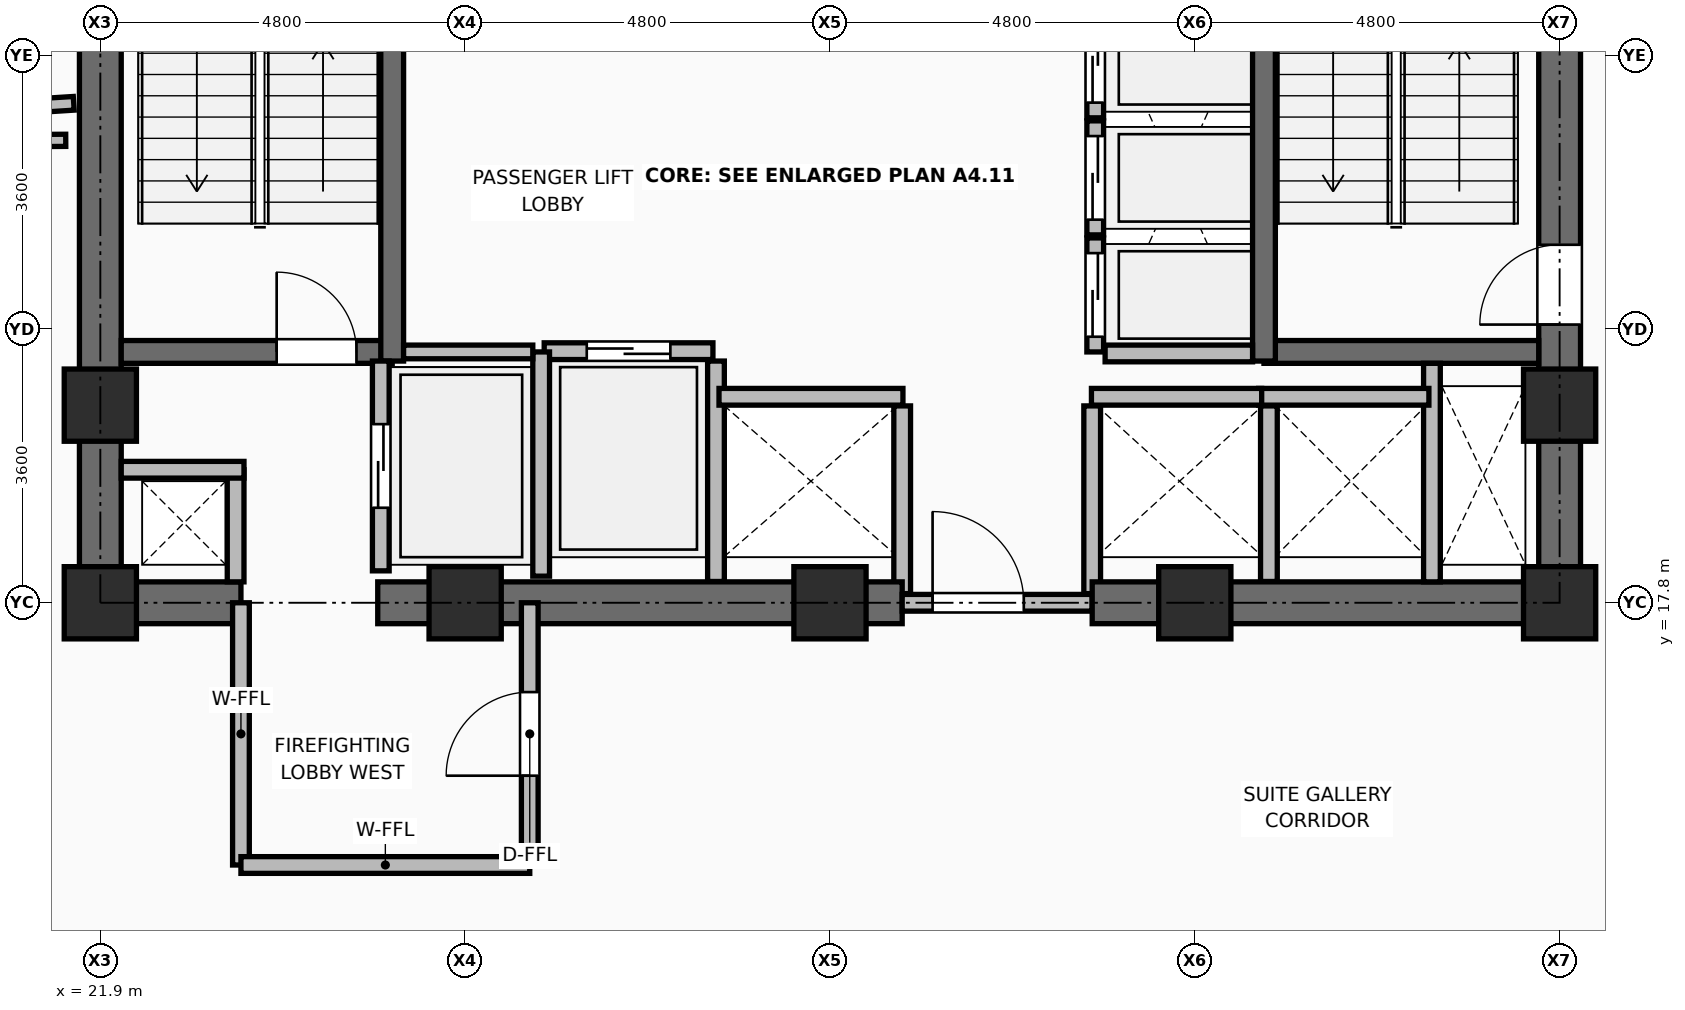
"""IFC4 building model, lengths in metres.
Left out: names, types, materials, properties, quantities, classifications, styles, units other than length and angle.
Written with IfcOpenShell. Run it as: python <this file> out.ifc"""

import sys

from ifc_helpers import new_model, si_unit, direction, frame, frame_2d, origin, origin_2d, place, context, subcontext, project, spatial, rectangle, extrude, element, fill, save


model = new_model("IFC4")
c1 = context("Model", 3, precision=1e-05, world=origin(), true_north=direction((0.0, 1.0)))
c2 = subcontext(c1, "Body", "Model", "MODEL_VIEW")
j1 = project(units=[si_unit("LENGTHUNIT", "METRE"), si_unit("PLANEANGLEUNIT", "RADIAN")], contexts=[c1])
p1 = place(None, origin())
s1 = spatial("IfcSite", under=j1, at=p1, CompositionType="ELEMENT")
p2 = place(p1, origin())
s2 = spatial("IfcBuilding", under=s1, at=p2, CompositionType="ELEMENT")
p3 = place(p2, frame((0.0, 0.0, 153.45)))
s3 = spatial("IfcBuildingStorey", under=s2, at=p3, CompositionType="ELEMENT", Elevation=153.45)
for number, where, z_axis, x_axis in (
    (1, (21.9, 17.8, 0.0), (0.0, 0.0, 1.0), (1.0, 0.0, 0.0)),
    (2, (26.7, 17.8, 0.0), (0.0, 0.0, 1.0), (1.0, 0.0, 0.0)),
    (3, (31.5, 17.8, 0.0), (0.0, 0.0, 1.0), (1.0, 0.0, 0.0)),
    (4, (36.3, 17.8, 0.0), (0.0, 0.0, 1.0), (1.0, 0.0, 0.0)),
    (5, (41.1, 17.8, 0.0), (0.0, 0.0, 1.0), (1.0, 0.0, 0.0)),
    (6, (21.9, 20.4, 0.0), (0.0, 0.0, 1.0), (1.0, 0.0, 0.0)),
    (7, (41.1, 20.4, 0.0), (0.0, 0.0, 1.0), (1.0, 0.0, 0.0)),
):
    element("IfcColumn", number, at=place(p3, frame(where, z_axis=z_axis, x_axis=x_axis)), inside=s3, PredefinedType="COLUMN", context=c2, shape_type="SweptSolid", body=[
        extrude(rectangle(XDim=0.95, YDim=0.95, at=origin_2d()), origin(), (0.0, 0.0, 1.0), 3.75),
    ])
p4 = place(p3, frame((30.0, 18.08, 0.0), z_axis=(0.0, 0.0, 1.0), x_axis=(0.0, 1.0, 0.0)))
e8 = element("IfcWall", 8, at=p4, inside=s3, PredefinedType="PARTITIONING", context=c2, shape_type="SweptSolid", body=[
    extrude(rectangle(XDim=2.9, YDim=0.22, at=frame_2d((1.45, 0.0))), origin(), (0.0, 0.0, 1.0), 3.545),
])
for number, where, z_axis, x_axis in (
    (9, (32.45, 17.92, 0.0), (0.0, 0.0, 1.0), (0.0, 1.0, 0.0)),
    (10, (34.95, 17.92, 0.0), (0.0, 0.0, 1.0), (0.0, 1.0, 0.0)),
):
    element("IfcWall", number, at=place(p3, frame(where, z_axis=z_axis, x_axis=x_axis)), inside=s3, PredefinedType="PARTITIONING", context=c2, shape_type="SweptSolid", body=[
        extrude(rectangle(XDim=2.47, YDim=0.22, at=frame_2d((1.235, 0.0))), origin(), (0.0, 0.0, 1.0), 3.006),
    ])
p5 = place(p3, frame((37.275, 18.08, 0.0), z_axis=(0.0, 0.0, 1.0), x_axis=(0.0, 1.0, 0.0)))
e11 = element("IfcWall", 11, at=p5, inside=s3, PredefinedType="PARTITIONING", context=c2, shape_type="SweptSolid", body=[
    extrude(rectangle(XDim=2.31, YDim=0.22, at=frame_2d((1.155, 0.0))), origin(), (0.0, 0.0, 1.0), 3.545),
])
p6 = place(p3, frame((21.625, 17.8, 0.0), z_axis=(0.0, 0.0, 1.0), x_axis=(1.0, 0.0, 0.0)))
e12 = element("IfcWall", 12, at=p6, inside=s3, PredefinedType="SHEAR", context=c2, shape_type="SweptSolid", body=[
    extrude(rectangle(XDim=2.125, YDim=0.55, at=frame_2d((1.062, 0.0))), origin(), (0.0, 0.0, 1.0), 3.57),
])
p7 = place(p3, frame((25.55, 17.8, 0.0), z_axis=(0.0, 0.0, 1.0), x_axis=(1.0, 0.0, 0.0)))
e13 = element("IfcWall", 13, at=p7, inside=s3, PredefinedType="SHEAR", context=c2, shape_type="SweptSolid", body=[
    extrude(rectangle(XDim=6.9, YDim=0.55, at=frame_2d((3.45, 0.0))), origin(), (0.0, 0.0, 1.0), 3.57),
])
p8 = place(p3, frame((32.45, 17.8, 0.0), z_axis=(0.0, 0.0, 1.0), x_axis=(1.0, 0.0, 0.0)))
e14 = element("IfcWall", 14, at=p8, inside=s3, PredefinedType="PARTITIONING", context=c2, shape_type="SweptSolid", body=[
    extrude(rectangle(XDim=2.5, YDim=0.22, at=frame_2d((1.25, 0.0))), origin(), (0.0, 0.0, 1.0), 3.006),
])
p9 = place(p8, frame((0.4, 0.0, 0.0)))
e15 = element("IfcOpeningElement", 15, at=p9, cuts=e14, PredefinedType="OPENING", context=c2, shape_type="SweptSolid", body=[
    extrude(rectangle(XDim=1.2, YDim=2.1, at=frame_2d((0.6, 1.05))), frame((0.0, 0.12, 0.0), z_axis=(0.0, -1.0, 0.0), x_axis=(1.0, 0.0, 0.0)), (0.0, 0.0, 1.0), 0.24),
])
p10 = place(p3, frame((34.95, 17.8, 0.0), z_axis=(0.0, 0.0, 1.0), x_axis=(1.0, 0.0, 0.0)))
e16 = element("IfcWall", 16, at=p10, inside=s3, PredefinedType="SHEAR", context=c2, shape_type="SweptSolid", body=[
    extrude(rectangle(XDim=6.425, YDim=0.55, at=frame_2d((3.212, 0.0))), origin(), (0.0, 0.0, 1.0), 3.57),
])
p11 = place(p3, frame((21.9, 18.075, 0.0), z_axis=(0.0, 0.0, 1.0), x_axis=(0.0, 1.0, 0.0)))
e17 = element("IfcWall", 17, at=p11, inside=s3, PredefinedType="SHEAR", context=c2, shape_type="SweptSolid", body=[
    extrude(rectangle(XDim=14.1, YDim=0.55, at=frame_2d((7.05, 0.0))), origin(), (0.0, 0.0, 1.0), 3.57),
])
p12 = place(p3, frame((41.1, 18.075, 0.0), z_axis=(0.0, 0.0, 1.0), x_axis=(0.0, 1.0, 0.0)))
e18 = element("IfcWall", 18, at=p12, inside=s3, PredefinedType="SHEAR", context=c2, shape_type="SweptSolid", body=[
    extrude(rectangle(XDim=14.1, YDim=0.55, at=frame_2d((7.05, 0.0))), origin(), (0.0, 0.0, 1.0), 3.57),
])
p13 = place(p12, frame((3.385, 0.0, 0.0)))
e19 = element("IfcOpeningElement", 19, at=p13, cuts=e18, PredefinedType="OPENING", context=c2, shape_type="SweptSolid", body=[
    extrude(rectangle(XDim=1.05, YDim=2.1, at=frame_2d((0.525, 1.05))), frame((0.0, 0.285, 0.0), z_axis=(0.0, -1.0, 0.0), x_axis=(1.0, 0.0, 0.0)), (0.0, 0.0, 1.0), 0.57),
])
p14 = place(p3, frame((22.175, 21.1, 0.0), z_axis=(0.0, 0.0, 1.0), x_axis=(1.0, 0.0, 0.0)))
e20 = element("IfcWall", 20, at=p14, inside=s3, PredefinedType="SHEAR", context=c2, shape_type="SweptSolid", body=[
    extrude(rectangle(XDim=3.565, YDim=0.3, at=frame_2d((1.782, 0.0))), origin(), (0.0, 0.0, 1.0), 3.57),
])
p15 = place(p14, frame((2.045, 0.0, 0.0)))
e21 = element("IfcOpeningElement", 21, at=p15, cuts=e20, PredefinedType="OPENING", context=c2, shape_type="SweptSolid", body=[
    extrude(rectangle(XDim=1.05, YDim=2.1, at=frame_2d((0.525, 1.05))), frame((0.0, 0.16, 0.0), z_axis=(0.0, -1.0, 0.0), x_axis=(1.0, 0.0, 0.0)), (0.0, 0.0, 1.0), 0.32),
])
p16 = place(p3, frame((25.74, 20.98, 0.0), z_axis=(0.0, 0.0, 1.0), x_axis=(0.0, 1.0, 0.0)))
e22 = element("IfcWall", 22, at=p16, inside=s3, PredefinedType="SHEAR", context=c2, shape_type="SweptSolid", body=[
    extrude(rectangle(XDim=7.99, YDim=0.3, at=frame_2d((3.995, 0.0))), origin(), (0.0, 0.0, 1.0), 3.57),
])
p17 = place(p3, frame((37.21, 21.1, 0.0), z_axis=(0.0, 0.0, 1.0), x_axis=(1.0, 0.0, 0.0)))
e23 = element("IfcWall", 23, at=p17, inside=s3, PredefinedType="SHEAR", context=c2, shape_type="SweptSolid", body=[
    extrude(rectangle(XDim=3.615, YDim=0.3, at=frame_2d((1.808, 0.0))), origin(), (0.0, 0.0, 1.0), 3.57),
])
p18 = place(p3, frame((37.21, 20.98, 0.0), z_axis=(0.0, 0.0, 1.0), x_axis=(0.0, 1.0, 0.0)))
e24 = element("IfcWall", 24, at=p18, inside=s3, PredefinedType="SHEAR", context=c2, shape_type="SweptSolid", body=[
    extrude(rectangle(XDim=7.99, YDim=0.3, at=frame_2d((3.995, 0.0))), origin(), (0.0, 0.0, 1.0), 3.57),
])
p19 = place(p3, frame((23.68, 18.075, 0.0), z_axis=(0.0, 0.0, 1.0), x_axis=(0.0, 1.0, 0.0)))
e25 = element("IfcWall", 25, at=p19, inside=s3, PredefinedType="PARTITIONING", context=c2, shape_type="SweptSolid", body=[
    extrude(rectangle(XDim=1.475, YDim=0.22, at=frame_2d((0.738, 0.0))), origin(), (0.0, 0.0, 1.0), 3.55),
])
p20 = place(p3, frame((22.175, 19.55, 0.0), z_axis=(0.0, 0.0, 1.0), x_axis=(1.0, 0.0, 0.0)))
e26 = element("IfcWall", 26, at=p20, inside=s3, PredefinedType="PARTITIONING", context=c2, shape_type="SweptSolid", body=[
    extrude(rectangle(XDim=1.615, YDim=0.22, at=frame_2d((0.808, 0.0))), origin(), (0.0, 0.0, 1.0), 2.595),
])
p21 = place(p3, frame((39.42, 18.075, 0.0), z_axis=(0.0, 0.0, 1.0), x_axis=(0.0, 1.0, 0.0)))
e27 = element("IfcWall", 27, at=p21, inside=s3, PredefinedType="PARTITIONING", context=c2, shape_type="SweptSolid", body=[
    extrude(rectangle(XDim=2.875, YDim=0.22, at=frame_2d((1.438, 0.0))), origin(), (0.0, 0.0, 1.0), 3.55),
])
p22 = place(p3, frame((25.59, 18.22, 0.0), z_axis=(0.0, 0.0, 1.0), x_axis=(0.0, 1.0, 0.0)))
e28 = element("IfcWall", 28, at=p22, inside=s3, PredefinedType="PARTITIONING", context=c2, shape_type="SweptSolid", body=[
    extrude(rectangle(XDim=2.76, YDim=0.22, at=frame_2d((1.38, 0.0))), origin(), (0.0, 0.0, 1.0), 3.55),
])
p23 = place(p22, frame((0.83, 0.0, 0.0)))
e29 = element("IfcOpeningElement", 29, at=p23, cuts=e28, PredefinedType="OPENING", context=c2, shape_type="SweptSolid", body=[
    extrude(rectangle(XDim=1.1, YDim=2.2, at=frame_2d((0.55, 1.1))), frame((0.0, 0.12, 0.0), z_axis=(0.0, -1.0, 0.0), x_axis=(1.0, 0.0, 0.0)), (0.0, 0.0, 1.0), 0.24),
])
p24 = place(p3, frame((27.74, 21.11, 0.0), z_axis=(0.0, 0.0, 1.0), x_axis=(1.0, 0.0, 0.0)))
e30 = element("IfcWall", 30, at=p24, inside=s3, PredefinedType="PARTITIONING", context=c2, shape_type="SweptSolid", body=[
    extrude(rectangle(XDim=2.22, YDim=0.22, at=frame_2d((1.11, 0.0))), origin(), (0.0, 0.0, 1.0), 3.55),
])
p25 = place(p24, frame((0.56, 0.0, 0.0)))
e31 = element("IfcOpeningElement", 31, at=p25, cuts=e30, PredefinedType="OPENING", context=c2, shape_type="SweptSolid", body=[
    extrude(rectangle(XDim=1.1, YDim=2.2, at=frame_2d((0.55, 1.1))), frame((0.0, 0.12, 0.0), z_axis=(0.0, -1.0, 0.0), x_axis=(1.0, 0.0, 0.0)), (0.0, 0.0, 1.0), 0.24),
])
p26 = place(p3, frame((30.04, 20.51, 0.0), z_axis=(0.0, 0.0, 1.0), x_axis=(1.0, 0.0, 0.0)))
e32 = element("IfcWall", 32, at=p26, inside=s3, PredefinedType="PARTITIONING", context=c2, shape_type="SweptSolid", body=[
    extrude(rectangle(XDim=2.42, YDim=0.22, at=frame_2d((1.21, 0.0))), origin(), (0.0, 0.0, 1.0), 3.55),
])
for number, where, z_axis, x_axis in (
    (33, (37.14, 20.51, 0.0), (0.0, 0.0, 1.0), (1.0, 0.0, 0.0)),
    (34, (34.94, 20.51, 0.0), (0.0, 0.0, 1.0), (1.0, 0.0, 0.0)),
):
    element("IfcWall", number, at=place(p3, frame(where, z_axis=z_axis, x_axis=x_axis)), inside=s3, PredefinedType="PARTITIONING", context=c2, shape_type="SweptSolid", body=[
        extrude(rectangle(XDim=2.24, YDim=0.22, at=frame_2d((1.12, 0.0))), origin(), (0.0, 0.0, 1.0), 3.55),
    ])
p27 = place(p3, frame((34.99, 21.1, 0.0), z_axis=(0.0, 0.0, 1.0), x_axis=(0.0, 1.0, 0.0)))
e35 = element("IfcWall", 35, at=p27, inside=s3, PredefinedType="PARTITIONING", context=c2, shape_type="SweptSolid", body=[
    extrude(rectangle(XDim=1.5, YDim=0.22, at=frame_2d((0.75, 0.0))), origin(), (0.0, 0.0, 1.0), 3.55),
])
p28 = place(p27, frame((0.2, 0.0, 0.0)))
e36 = element("IfcOpeningElement", 36, at=p28, cuts=e35, PredefinedType="OPENING", context=c2, shape_type="SweptSolid", body=[
    extrude(rectangle(XDim=1.1, YDim=2.2, at=frame_2d((0.55, 1.1))), frame((0.0, 0.12, 0.0), z_axis=(0.0, -1.0, 0.0), x_axis=(1.0, 0.0, 0.0)), (0.0, 0.0, 1.0), 0.24),
])
p29 = place(p3, frame((34.99, 22.64, 0.0), z_axis=(0.0, 0.0, 1.0), x_axis=(0.0, 1.0, 0.0)))
e37 = element("IfcWall", 37, at=p29, inside=s3, PredefinedType="PARTITIONING", context=c2, shape_type="SweptSolid", body=[
    extrude(rectangle(XDim=1.5, YDim=0.22, at=frame_2d((0.75, 0.0))), origin(), (0.0, 0.0, 1.0), 3.55),
])
p30 = place(p29, frame((0.2, 0.0, 0.0)))
e38 = element("IfcOpeningElement", 38, at=p30, cuts=e37, PredefinedType="OPENING", context=c2, shape_type="SweptSolid", body=[
    extrude(rectangle(XDim=1.1, YDim=2.2, at=frame_2d((0.55, 1.1))), frame((0.0, 0.12, 0.0), z_axis=(0.0, -1.0, 0.0), x_axis=(1.0, 0.0, 0.0)), (0.0, 0.0, 1.0), 0.24),
])
p31 = place(p3, frame((34.99, 24.18, 0.0), z_axis=(0.0, 0.0, 1.0), x_axis=(0.0, 1.0, 0.0)))
e39 = element("IfcWall", 39, at=p31, inside=s3, PredefinedType="PARTITIONING", context=c2, shape_type="SweptSolid", body=[
    extrude(rectangle(XDim=1.5, YDim=0.22, at=frame_2d((0.75, 0.0))), origin(), (0.0, 0.0, 1.0), 3.55),
])
p32 = place(p31, frame((0.2, 0.0, 0.0)))
e40 = element("IfcOpeningElement", 40, at=p32, cuts=e39, PredefinedType="OPENING", context=c2, shape_type="SweptSolid", body=[
    extrude(rectangle(XDim=1.1, YDim=2.2, at=frame_2d((0.55, 1.1))), frame((0.0, 0.12, 0.0), z_axis=(0.0, -1.0, 0.0), x_axis=(1.0, 0.0, 0.0)), (0.0, 0.0, 1.0), 0.24),
])
p33 = place(p3, frame((27.7, 18.15, 0.0), z_axis=(0.0, 0.0, 1.0), x_axis=(0.0, 1.0, 0.0)))
e41 = element("IfcWall", 41, at=p33, inside=s3, PredefinedType="PARTITIONING", context=c2, shape_type="SweptSolid", body=[
    extrude(rectangle(XDim=2.95, YDim=0.22, at=frame_2d((1.475, 0.0))), origin(), (0.0, 0.0, 1.0), 3.55),
])
p34 = place(p3, frame((35.12, 21.08, 0.0), z_axis=(0.0, 0.0, 1.0), x_axis=(1.0, 0.0, 0.0)))
e42 = element("IfcWall", 42, at=p34, inside=s3, PredefinedType="PARTITIONING", context=c2, shape_type="SweptSolid", body=[
    extrude(rectangle(XDim=1.94, YDim=0.22, at=frame_2d((0.97, 0.0))), origin(), (0.0, 0.0, 1.0), 3.55),
])
p35 = place(p3, frame((25.89, 21.1, 0.0), z_axis=(0.0, 0.0, 1.0), x_axis=(1.0, 0.0, 0.0)))
e43 = element("IfcWall", 43, at=p35, inside=s3, PredefinedType="PARTITIONING", context=c2, shape_type="SweptSolid", body=[
    extrude(rectangle(XDim=1.7, YDim=0.18, at=frame_2d((0.85, 0.0))), origin(), (0.0, 0.0, 1.0), 3.55),
])
p36 = place(p3, frame((23.75, 14.35, 0.0), z_axis=(0.0, 0.0, 1.0), x_axis=(0.0, 1.0, 0.0)))
e44 = element("IfcWall", 44, at=p36, inside=s3, PredefinedType="PARTITIONING", context=c2, shape_type="SweptSolid", body=[
    extrude(rectangle(XDim=3.45, YDim=0.22, at=frame_2d((1.725, 0.0))), origin(), (0.0, 0.0, 1.0), 3.006),
])
p37 = place(p3, frame((23.75, 14.35, 0.0), z_axis=(0.0, 0.0, 1.0), x_axis=(1.0, 0.0, 0.0)))
e45 = element("IfcWall", 45, at=p37, inside=s3, PredefinedType="PARTITIONING", context=c2, shape_type="SweptSolid", body=[
    extrude(rectangle(XDim=3.8, YDim=0.22, at=frame_2d((1.9, 0.0))), origin(), (0.0, 0.0, 1.0), 3.55),
])
p38 = place(p3, frame((27.55, 14.35, 0.0), z_axis=(0.0, 0.0, 1.0), x_axis=(0.0, 1.0, 0.0)))
e46 = element("IfcWall", 46, at=p38, inside=s3, PredefinedType="PARTITIONING", context=c2, shape_type="SweptSolid", body=[
    extrude(rectangle(XDim=3.45, YDim=0.22, at=frame_2d((1.725, 0.0))), origin(), (0.0, 0.0, 1.0), 3.006),
])
p39 = place(p38, frame((1.175, 0.0, 0.0)))
e47 = element("IfcOpeningElement", 47, at=p39, cuts=e46, PredefinedType="OPENING", context=c2, shape_type="SweptSolid", body=[
    extrude(rectangle(XDim=1.1, YDim=2.1, at=frame_2d((0.55, 1.05))), frame((0.0, 0.12, 0.0), z_axis=(0.0, -1.0, 0.0), x_axis=(1.0, 0.0, 0.0)), (0.0, 0.0, 1.0), 0.24),
])
p40 = place(p3, frame((17.106, 23.858, 0.0), z_axis=(0.0, 0.0, 1.0), x_axis=(0.999981878077, 0.006020258873, 0.0)))
e48 = element("IfcWall", 48, at=p40, inside=s3, PredefinedType="PARTITIONING", context=c2, shape_type="SweptSolid", body=[
    extrude(rectangle(XDim=4.339, YDim=0.16, at=frame_2d((2.169, 0.0))), origin(), (0.0, 0.0, 1.0), 2.595),
])
p41 = place(p3, frame((21.55, 24.371, 0.0), z_axis=(0.0, 0.0, 1.0), x_axis=(-0.998004655197, -0.063140384899, 0.0)))
e49 = element("IfcWall", 49, at=p41, inside=s3, PredefinedType="PARTITIONING", context=c2, shape_type="SweptSolid", body=[
    extrude(rectangle(XDim=15.157, YDim=0.18, at=frame_2d((7.579, 0.0))), origin(), (0.0, 0.0, 1.0), 2.595),
])
p42 = place(p9, origin())
e50 = element("IfcDoor", 50, at=p42, inside=s3, OperationType="SINGLE_SWING_LEFT", PredefinedType="DOOR", context=c2, shape_type="SweptSolid", body=[
    extrude(rectangle(XDim=1.2, YDim=2.1, at=frame_2d((0.6, 1.05))), frame((0.0, 0.025, 0.0), z_axis=(0.0, -1.0, 0.0), x_axis=(1.0, 0.0, 0.0)), (0.0, 0.0, 1.0), 0.05),
])
fill(e15, e50)
p43 = place(p15, origin())
e51 = element("IfcDoor", 51, at=p43, inside=s3, OperationType="SINGLE_SWING_LEFT", PredefinedType="DOOR", context=c2, shape_type="SweptSolid", body=[
    extrude(rectangle(XDim=1.05, YDim=2.1, at=frame_2d((0.525, 1.05))), frame((0.0, 0.025, 0.0), z_axis=(0.0, -1.0, 0.0), x_axis=(1.0, 0.0, 0.0)), (0.0, 0.0, 1.0), 0.05),
])
fill(e21, e51)
p44 = place(p13, origin())
e52 = element("IfcDoor", 52, at=p44, inside=s3, OperationType="SINGLE_SWING_LEFT", PredefinedType="DOOR", context=c2, shape_type="SweptSolid", body=[
    extrude(rectangle(XDim=1.05, YDim=2.1, at=frame_2d((0.525, 1.05))), frame((0.0, 0.025, 0.0), z_axis=(0.0, -1.0, 0.0), x_axis=(1.0, 0.0, 0.0)), (0.0, 0.0, 1.0), 0.05),
])
fill(e19, e52)
p45 = place(p23, origin())
e53 = element("IfcDoor", 53, at=p45, inside=s3, OperationType="DOUBLE_DOOR_SLIDING", PredefinedType="DOOR", context=c2, shape_type="SweptSolid", body=[
    extrude(rectangle(XDim=1.1, YDim=2.2, at=frame_2d((0.55, 1.1))), frame((0.0, 0.025, 0.0), z_axis=(0.0, -1.0, 0.0), x_axis=(1.0, 0.0, 0.0)), (0.0, 0.0, 1.0), 0.05),
])
fill(e29, e53)
p46 = place(p25, origin())
e54 = element("IfcDoor", 54, at=p46, inside=s3, OperationType="DOUBLE_DOOR_SLIDING", PredefinedType="DOOR", context=c2, shape_type="SweptSolid", body=[
    extrude(rectangle(XDim=1.1, YDim=2.2, at=frame_2d((0.55, 1.1))), frame((0.0, 0.025, 0.0), z_axis=(0.0, -1.0, 0.0), x_axis=(1.0, 0.0, 0.0)), (0.0, 0.0, 1.0), 0.05),
])
fill(e31, e54)
p47 = place(p28, origin())
e55 = element("IfcDoor", 55, at=p47, inside=s3, OperationType="DOUBLE_DOOR_SLIDING", PredefinedType="DOOR", context=c2, shape_type="SweptSolid", body=[
    extrude(rectangle(XDim=1.1, YDim=2.2, at=frame_2d((0.55, 1.1))), frame((0.0, 0.025, 0.0), z_axis=(0.0, -1.0, 0.0), x_axis=(1.0, 0.0, 0.0)), (0.0, 0.0, 1.0), 0.05),
])
fill(e36, e55)
p48 = place(p30, origin())
e56 = element("IfcDoor", 56, at=p48, inside=s3, OperationType="DOUBLE_DOOR_SLIDING", PredefinedType="DOOR", context=c2, shape_type="SweptSolid", body=[
    extrude(rectangle(XDim=1.1, YDim=2.2, at=frame_2d((0.55, 1.1))), frame((0.0, 0.025, 0.0), z_axis=(0.0, -1.0, 0.0), x_axis=(1.0, 0.0, 0.0)), (0.0, 0.0, 1.0), 0.05),
])
fill(e38, e56)
p49 = place(p32, origin())
e57 = element("IfcDoor", 57, at=p49, inside=s3, OperationType="DOUBLE_DOOR_SLIDING", PredefinedType="DOOR", context=c2, shape_type="SweptSolid", body=[
    extrude(rectangle(XDim=1.1, YDim=2.2, at=frame_2d((0.55, 1.1))), frame((0.0, 0.025, 0.0), z_axis=(0.0, -1.0, 0.0), x_axis=(1.0, 0.0, 0.0)), (0.0, 0.0, 1.0), 0.05),
])
fill(e40, e57)
p50 = place(p39, origin())
e58 = element("IfcDoor", 58, at=p50, inside=s3, OperationType="SINGLE_SWING_LEFT", PredefinedType="DOOR", context=c2, shape_type="SweptSolid", body=[
    extrude(rectangle(XDim=1.1, YDim=2.1, at=frame_2d((0.55, 1.05))), frame((0.0, 0.025, 0.0), z_axis=(0.0, -1.0, 0.0), x_axis=(1.0, 0.0, 0.0)), (0.0, 0.0, 1.0), 0.05),
])
fill(e47, e58)
save(model, sys.argv[1])
